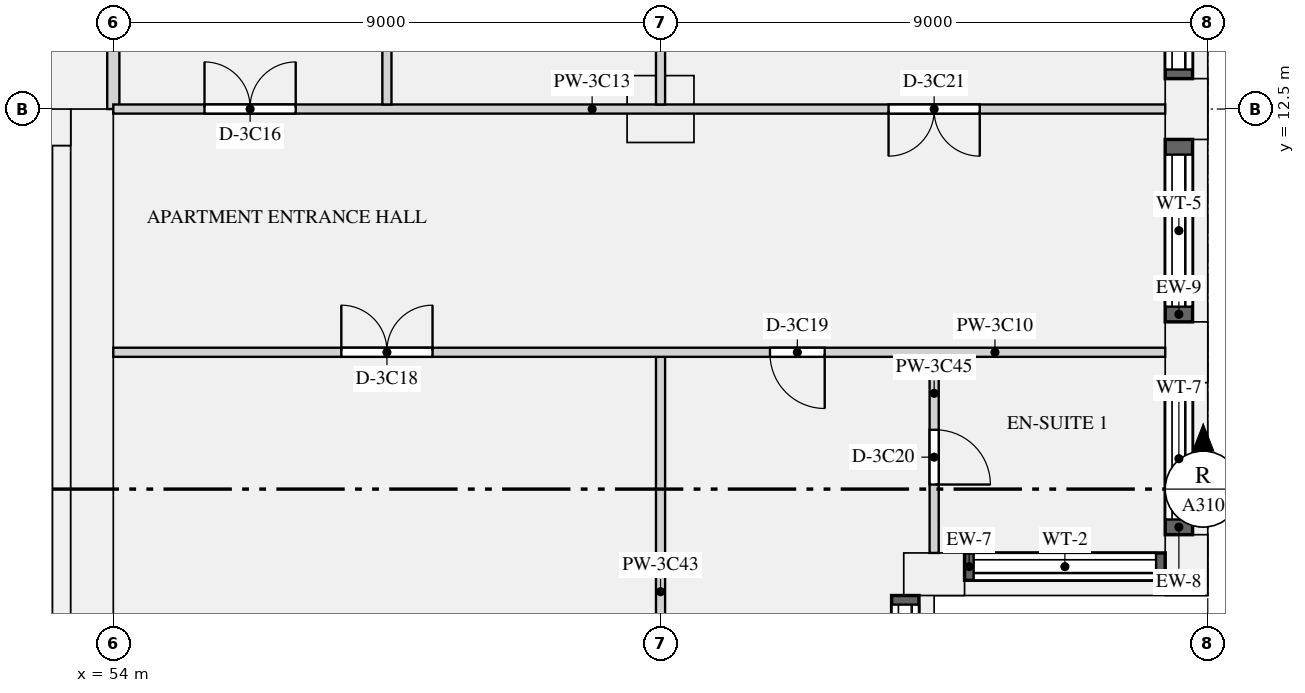
"""IFC4 building model, lengths in metres.
Left out: names, types, materials, properties, quantities, classifications, styles, units other than length and angle.
Written with IfcOpenShell. Run it as: python <this file> out.ifc"""

import sys

from ifc_helpers import new_model, si_unit, direction, frame, frame_2d, origin, origin_2d, place, context, subcontext, project, spatial, rectangle, extrude, element, fill, save


model = new_model("IFC4")
c1 = context("Model", 3, precision=1e-05, world=origin(), true_north=direction((0.0, 1.0)))
c2 = subcontext(c1, "Body", "Model", "MODEL_VIEW")
j1 = project(units=[si_unit("LENGTHUNIT", "METRE"), si_unit("PLANEANGLEUNIT", "RADIAN")], contexts=[c1])
p1 = place(None, origin())
s1 = spatial("IfcSite", under=j1, at=p1, CompositionType="ELEMENT")
p2 = place(p1, origin())
s2 = spatial("IfcBuilding", under=s1, at=p2, CompositionType="ELEMENT")
p3 = place(p2, frame((0.0, 0.0, 160.2)))
s3 = spatial("IfcBuildingStorey", under=s2, at=p3, CompositionType="ELEMENT", Elevation=160.2)
for number, where, z_axis, x_axis in (
    (1, (67.5, 4.85, 0.0), (0.0, 0.0, 1.0), (1.0, 0.0, 0.0)),
    (2, (71.65, 5.0, 0.0), (0.0, 0.0, 1.0), (0.0, 1.0, 0.0)),
    (3, (71.65, 8.5, 0.0), (0.0, 0.0, 1.0), (0.0, 1.0, 0.0)),
    (4, (71.65, 12.5, 0.0), (0.0, 0.0, 1.0), (0.0, 1.0, 0.0)),
):
    element("IfcColumn", number, at=place(p3, frame(where, z_axis=z_axis, x_axis=x_axis)), inside=s3, PredefinedType="USERDEFINED", context=c2, shape_type="SweptSolid", body=[
        extrude(rectangle(XDim=1.0, YDim=0.7, at=origin_2d()), origin(), (0.0, 0.0, 1.0), 3.15),
    ])
p4 = place(p3, frame((63.0, 12.5, 0.0), z_axis=(0.0, 0.0, 1.0), x_axis=(1.0, 0.0, 0.0)))
e5 = element("IfcColumn", 5, at=p4, inside=s3, PredefinedType="COLUMN", context=c2, shape_type="SweptSolid", body=[
    extrude(rectangle(XDim=1.1, YDim=1.1, at=origin_2d()), origin(), (0.0, 0.0, 1.0), 3.15),
])
p5 = place(p3, frame((53.65, 0.0, 0.0), z_axis=(0.0, 0.0, 1.0), x_axis=(0.0, 1.0, 0.0)))
e6 = element("IfcWall", 6, at=p5, inside=s3, PredefinedType="SHEAR", context=c2, shape_type="SweptSolid", body=[
    extrude(rectangle(XDim=12.5, YDim=0.7, at=frame_2d((6.25, 0.0))), origin(), (0.0, 0.0, 1.0), 3.15),
])
p6 = place(p3, frame((18.7, 12.2, 0.0), z_axis=(0.0, 0.0, 1.0), x_axis=(1.0, 0.0, 0.0)))
e7 = element("IfcWall", 7, at=p6, inside=s3, PredefinedType="SHEAR", context=c2, shape_type="SweptSolid", body=[
    extrude(rectangle(XDim=34.6, YDim=0.6, at=frame_2d((17.3, 0.0))), origin(), (0.0, 0.0, 1.0), 3.15),
])
p7 = place(p6, frame((24.475, 0.0, 0.0)))
e8 = element("IfcOpeningElement", 8, at=p7, cuts=e7, PredefinedType="OPENING", context=c2, shape_type="SweptSolid", body=[
    extrude(rectangle(XDim=1.1, YDim=2.1, at=frame_2d((0.55, 1.05))), frame((0.0, 0.31, 0.0), z_axis=(0.0, -1.0, 0.0), x_axis=(1.0, 0.0, 0.0)), (0.0, 0.0, 1.0), 0.62),
])
p8 = place(p6, frame((26.725, 0.0, 0.0)))
e9 = element("IfcOpeningElement", 9, at=p8, cuts=e7, PredefinedType="OPENING", context=c2, shape_type="SweptSolid", body=[
    extrude(rectangle(XDim=1.1, YDim=2.1, at=frame_2d((0.55, 1.05))), frame((0.0, 0.31, 0.0), z_axis=(0.0, -1.0, 0.0), x_axis=(1.0, 0.0, 0.0)), (0.0, 0.0, 1.0), 0.62),
])
p9 = place(p6, frame((28.975, 0.0, 0.0)))
e10 = element("IfcOpeningElement", 10, at=p9, cuts=e7, PredefinedType="OPENING", context=c2, shape_type="SweptSolid", body=[
    extrude(rectangle(XDim=1.1, YDim=2.1, at=frame_2d((0.55, 1.05))), frame((0.0, 0.31, 0.0), z_axis=(0.0, -1.0, 0.0), x_axis=(1.0, 0.0, 0.0)), (0.0, 0.0, 1.0), 0.62),
])
p10 = place(p6, frame((4.85, 0.0, 0.0)))
e11 = element("IfcOpeningElement", 11, at=p10, cuts=e7, PredefinedType="OPENING", context=c2, shape_type="SweptSolid", body=[
    extrude(rectangle(XDim=0.9, YDim=2.1, at=frame_2d((0.45, 1.05))), frame((0.0, 0.31, 0.0), z_axis=(0.0, -1.0, 0.0), x_axis=(1.0, 0.0, 0.0)), (0.0, 0.0, 1.0), 0.62),
])
p11 = place(p6, frame((13.85, 0.0, 0.0)))
e12 = element("IfcOpeningElement", 12, at=p11, cuts=e7, PredefinedType="OPENING", context=c2, shape_type="SweptSolid", body=[
    extrude(rectangle(XDim=0.9, YDim=2.1, at=frame_2d((0.45, 1.05))), frame((0.0, 0.31, 0.0), z_axis=(0.0, -1.0, 0.0), x_axis=(1.0, 0.0, 0.0)), (0.0, 0.0, 1.0), 0.62),
])
p12 = place(p6, frame((18.35, 0.0, 0.0)))
e13 = element("IfcOpeningElement", 13, at=p12, cuts=e7, PredefinedType="OPENING", context=c2, shape_type="SweptSolid", body=[
    extrude(rectangle(XDim=0.9, YDim=2.1, at=frame_2d((0.45, 1.05))), frame((0.0, 0.31, 0.0), z_axis=(0.0, -1.0, 0.0), x_axis=(1.0, 0.0, 0.0)), (0.0, 0.0, 1.0), 0.62),
])
p13 = place(p6, frame((1.45, 0.0, 0.0)))
e14 = element("IfcOpeningElement", 14, at=p13, cuts=e7, PredefinedType="OPENING", context=c2, shape_type="SweptSolid", body=[
    extrude(rectangle(XDim=1.2, YDim=2.1, at=frame_2d((0.6, 1.05))), frame((0.0, 0.31, 0.0), z_axis=(0.0, -1.0, 0.0), x_axis=(1.0, 0.0, 0.0)), (0.0, 0.0, 1.0), 0.62),
])
p14 = place(p6, frame((31.95, 0.0, 0.0)))
e15 = element("IfcOpeningElement", 15, at=p14, cuts=e7, PredefinedType="OPENING", context=c2, shape_type="SweptSolid", body=[
    extrude(rectangle(XDim=1.2, YDim=2.1, at=frame_2d((0.6, 1.05))), frame((0.0, 0.31, 0.0), z_axis=(0.0, -1.0, 0.0), x_axis=(1.0, 0.0, 0.0)), (0.0, 0.0, 1.0), 0.62),
])
p15 = place(p3, frame((53.15, 1.0, 0.0), z_axis=(0.0, 0.0, 1.0), x_axis=(0.0, 1.0, 0.0)))
e16 = element("IfcWall", 16, at=p15, inside=s3, PredefinedType="SHEAR", context=c2, shape_type="SweptSolid", body=[
    extrude(rectangle(XDim=10.9, YDim=0.3, at=frame_2d((5.45, 0.0))), origin(), (0.0, 0.0, 1.0), 3.15),
])
p16 = place(p3, frame((67.025, 1.0, 0.9), z_axis=(0.0, 0.0, 1.0), x_axis=(0.0, 1.0, 0.0)))
e17 = element("IfcWall", 17, at=p16, inside=s3, PredefinedType="SOLIDWALL", context=c2, shape_type="SweptSolid", body=[
    extrude(rectangle(XDim=3.5, YDim=0.45, at=frame_2d((1.75, 0.0))), origin(), (0.0, 0.0, 1.0), 1.93),
])
p17 = place(p16, frame((0.15, 0.0, 0.15)))
e18 = element("IfcOpeningElement", 18, at=p17, cuts=e17, PredefinedType="OPENING", context=c2, shape_type="SweptSolid", body=[
    extrude(rectangle(XDim=3.2, YDim=1.5, at=frame_2d((1.6, 0.75))), frame((0.0, 0.235, 0.0), z_axis=(0.0, -1.0, 0.0), x_axis=(1.0, 0.0, 0.0)), (0.0, 0.0, 1.0), 0.47),
])
p18 = place(p3, frame((68.0, 4.975, 0.9), z_axis=(0.0, 0.0, 1.0), x_axis=(1.0, 0.0, 0.0)))
e19 = element("IfcWall", 19, at=p18, inside=s3, PredefinedType="SOLIDWALL", context=c2, shape_type="SweptSolid", body=[
    extrude(rectangle(XDim=3.3, YDim=0.45, at=frame_2d((1.65, 0.0))), origin(), (0.0, 0.0, 1.0), 1.93),
])
p19 = place(p18, frame((0.15, 0.0, 0.15)))
e20 = element("IfcOpeningElement", 20, at=p19, cuts=e19, PredefinedType="OPENING", context=c2, shape_type="SweptSolid", body=[
    extrude(rectangle(XDim=3.0, YDim=1.5, at=frame_2d((1.5, 0.75))), frame((0.0, 0.235, 0.0), z_axis=(0.0, -1.0, 0.0), x_axis=(1.0, 0.0, 0.0)), (0.0, 0.0, 1.0), 0.47),
])
p20 = place(p3, frame((71.525, 5.5, 0.9), z_axis=(0.0, 0.0, 1.0), x_axis=(0.0, 1.0, 0.0)))
e21 = element("IfcWall", 21, at=p20, inside=s3, PredefinedType="SOLIDWALL", context=c2, shape_type="SweptSolid", body=[
    extrude(rectangle(XDim=2.5, YDim=0.45, at=frame_2d((1.25, 0.0))), origin(), (0.0, 0.0, 1.0), 1.93),
])
p21 = place(p20, frame((0.25, 0.0, 0.15)))
e22 = element("IfcOpeningElement", 22, at=p21, cuts=e21, PredefinedType="OPENING", context=c2, shape_type="SweptSolid", body=[
    extrude(rectangle(XDim=2.0, YDim=1.5, at=frame_2d((1.0, 0.75))), frame((0.0, 0.235, 0.0), z_axis=(0.0, -1.0, 0.0), x_axis=(1.0, 0.0, 0.0)), (0.0, 0.0, 1.0), 0.47),
])
p22 = place(p3, frame((71.525, 9.0, 0.9), z_axis=(0.0, 0.0, 1.0), x_axis=(0.0, 1.0, 0.0)))
e23 = element("IfcWall", 23, at=p22, inside=s3, PredefinedType="SOLIDWALL", context=c2, shape_type="SweptSolid", body=[
    extrude(rectangle(XDim=3.0, YDim=0.45, at=frame_2d((1.5, 0.0))), origin(), (0.0, 0.0, 1.0), 1.93),
])
p23 = place(p22, frame((0.25, 0.0, 0.15)))
e24 = element("IfcOpeningElement", 24, at=p23, cuts=e23, PredefinedType="OPENING", context=c2, shape_type="SweptSolid", body=[
    extrude(rectangle(XDim=2.5, YDim=1.5, at=frame_2d((1.25, 0.75))), frame((0.0, 0.235, 0.0), z_axis=(0.0, -1.0, 0.0), x_axis=(1.0, 0.0, 0.0)), (0.0, 0.0, 1.0), 0.47),
])
p24 = place(p3, frame((71.525, 13.0, 0.9), z_axis=(0.0, 0.0, 1.0), x_axis=(0.0, 1.0, 0.0)))
e25 = element("IfcWall", 25, at=p24, inside=s3, PredefinedType="SOLIDWALL", context=c2, shape_type="SweptSolid", body=[
    extrude(rectangle(XDim=2.8, YDim=0.45, at=frame_2d((1.4, 0.0))), origin(), (0.0, 0.0, 1.0), 1.93),
])
p25 = place(p24, frame((0.15, 0.0, 0.15)))
e26 = element("IfcOpeningElement", 26, at=p25, cuts=e25, PredefinedType="OPENING", context=c2, shape_type="SweptSolid", body=[
    extrude(rectangle(XDim=2.5, YDim=1.5, at=frame_2d((1.25, 0.75))), frame((0.0, 0.235, 0.0), z_axis=(0.0, -1.0, 0.0), x_axis=(1.0, 0.0, 0.0)), (0.0, 0.0, 1.0), 0.47),
])
p26 = place(p3, frame((54.0, 12.5, 0.0), z_axis=(0.0, 0.0, 1.0), x_axis=(0.0, 1.0, 0.0)))
e27 = element("IfcWall", 27, at=p26, inside=s3, PredefinedType="PARTITIONING", context=c2, shape_type="SweptSolid", body=[
    extrude(rectangle(XDim=3.4, YDim=0.2, at=frame_2d((1.7, 0.0))), origin(), (0.0, 0.0, 1.0), 2.83),
])
p27 = place(p3, frame((54.0, 8.5, 0.0), z_axis=(0.0, 0.0, 1.0), x_axis=(1.0, 0.0, 0.0)))
e28 = element("IfcWall", 28, at=p27, inside=s3, PredefinedType="PARTITIONING", context=c2, shape_type="SweptSolid", body=[
    extrude(rectangle(XDim=17.3, YDim=0.15, at=frame_2d((8.65, 0.0))), origin(), (0.0, 0.0, 1.0), 2.83),
])
p28 = place(p27, frame((3.75, 0.0, 0.0)))
e29 = element("IfcOpeningElement", 29, at=p28, cuts=e28, PredefinedType="OPENING", context=c2, shape_type="SweptSolid", body=[
    extrude(rectangle(XDim=1.5, YDim=2.1, at=frame_2d((0.75, 1.05))), frame((0.0, 0.085, 0.0), z_axis=(0.0, -1.0, 0.0), x_axis=(1.0, 0.0, 0.0)), (0.0, 0.0, 1.0), 0.17),
])
p29 = place(p27, frame((10.8, 0.0, 0.0)))
e30 = element("IfcOpeningElement", 30, at=p29, cuts=e28, PredefinedType="OPENING", context=c2, shape_type="SweptSolid", body=[
    extrude(rectangle(XDim=0.9, YDim=2.1, at=frame_2d((0.45, 1.05))), frame((0.0, 0.085, 0.0), z_axis=(0.0, -1.0, 0.0), x_axis=(1.0, 0.0, 0.0)), (0.0, 0.0, 1.0), 0.17),
])
p30 = place(p3, frame((54.0, 12.5, 0.0), z_axis=(0.0, 0.0, 1.0), x_axis=(1.0, 0.0, 0.0)))
e31 = element("IfcWall", 31, at=p30, inside=s3, PredefinedType="PARTITIONING", context=c2, shape_type="SweptSolid", body=[
    extrude(rectangle(XDim=17.3, YDim=0.15, at=frame_2d((8.65, 0.0))), origin(), (0.0, 0.0, 1.0), 2.83),
])
p31 = place(p30, frame((1.5, 0.0, 0.0)))
e32 = element("IfcOpeningElement", 32, at=p31, cuts=e31, PredefinedType="OPENING", context=c2, shape_type="SweptSolid", body=[
    extrude(rectangle(XDim=1.5, YDim=2.1, at=frame_2d((0.75, 1.05))), frame((0.0, 0.085, 0.0), z_axis=(0.0, -1.0, 0.0), x_axis=(1.0, 0.0, 0.0)), (0.0, 0.0, 1.0), 0.17),
])
p32 = place(p30, frame((12.75, 0.0, 0.0)))
e33 = element("IfcOpeningElement", 33, at=p32, cuts=e31, PredefinedType="OPENING", context=c2, shape_type="SweptSolid", body=[
    extrude(rectangle(XDim=1.5, YDim=2.1, at=frame_2d((0.75, 1.05))), frame((0.0, 0.085, 0.0), z_axis=(0.0, -1.0, 0.0), x_axis=(1.0, 0.0, 0.0)), (0.0, 0.0, 1.0), 0.17),
])
p33 = place(p3, frame((58.5, 12.575, 0.0), z_axis=(0.0, 0.0, 1.0), x_axis=(0.0, 1.0, 0.0)))
e34 = element("IfcWall", 34, at=p33, inside=s3, PredefinedType="PARTITIONING", context=c2, shape_type="SweptSolid", body=[
    extrude(rectangle(XDim=10.325, YDim=0.15, at=frame_2d((5.163, 0.0))), origin(), (0.0, 0.0, 1.0), 2.83),
])
p34 = place(p33, frame((4.75, 0.0, 0.0)))
e35 = element("IfcOpeningElement", 35, at=p34, cuts=e34, PredefinedType="OPENING", context=c2, shape_type="SweptSolid", body=[
    extrude(rectangle(XDim=0.9, YDim=2.1, at=frame_2d((0.45, 1.05))), frame((0.0, 0.085, 0.0), z_axis=(0.0, -1.0, 0.0), x_axis=(1.0, 0.0, 0.0)), (0.0, 0.0, 1.0), 0.17),
])
p35 = place(p3, frame((63.0, 0.7, 0.0), z_axis=(0.0, 0.0, 1.0), x_axis=(0.0, 1.0, 0.0)))
e36 = element("IfcWall", 36, at=p35, inside=s3, PredefinedType="PARTITIONING", context=c2, shape_type="SweptSolid", body=[
    extrude(rectangle(XDim=7.725, YDim=0.15, at=frame_2d((3.863, 0.0))), origin(), (0.0, 0.0, 1.0), 2.83),
])
p36 = place(p3, frame((63.0, 12.575, 0.0), z_axis=(0.0, 0.0, 1.0), x_axis=(0.0, 1.0, 0.0)))
e37 = element("IfcWall", 37, at=p36, inside=s3, PredefinedType="PARTITIONING", context=c2, shape_type="SweptSolid", body=[
    extrude(rectangle(XDim=16.35, YDim=0.15, at=frame_2d((8.175, 0.0))), origin(), (0.0, 0.0, 1.0), 2.83),
])
p37 = place(p36, frame((5.225, 0.0, 0.0)))
e38 = element("IfcOpeningElement", 38, at=p37, cuts=e37, PredefinedType="OPENING", context=c2, shape_type="SweptSolid", body=[
    extrude(rectangle(XDim=0.9, YDim=2.1, at=frame_2d((0.45, 1.05))), frame((0.0, 0.085, 0.0), z_axis=(0.0, -1.0, 0.0), x_axis=(1.0, 0.0, 0.0)), (0.0, 0.0, 1.0), 0.17),
])
p38 = place(p36, frame((13.75, 0.0, 0.0)))
e39 = element("IfcOpeningElement", 39, at=p38, cuts=e37, PredefinedType="OPENING", context=c2, shape_type="SweptSolid", body=[
    extrude(rectangle(XDim=0.9, YDim=2.1, at=frame_2d((0.45, 1.05))), frame((0.0, 0.085, 0.0), z_axis=(0.0, -1.0, 0.0), x_axis=(1.0, 0.0, 0.0)), (0.0, 0.0, 1.0), 0.17),
])
p39 = place(p3, frame((67.5, 5.2, 0.0), z_axis=(0.0, 0.0, 1.0), x_axis=(0.0, 1.0, 0.0)))
e40 = element("IfcWall", 40, at=p39, inside=s3, PredefinedType="PARTITIONING", context=c2, shape_type="SweptSolid", body=[
    extrude(rectangle(XDim=3.225, YDim=0.15, at=frame_2d((1.613, 0.0))), origin(), (0.0, 0.0, 1.0), 2.83),
])
p40 = place(p39, frame((1.125, 0.0, 0.0)))
e41 = element("IfcOpeningElement", 41, at=p40, cuts=e40, PredefinedType="OPENING", context=c2, shape_type="SweptSolid", body=[
    extrude(rectangle(XDim=0.9, YDim=2.1, at=frame_2d((0.45, 1.05))), frame((0.0, 0.085, 0.0), z_axis=(0.0, -1.0, 0.0), x_axis=(1.0, 0.0, 0.0)), (0.0, 0.0, 1.0), 0.17),
])
p41 = place(p17, origin())
e42 = element("IfcWindow", 42, at=p41, inside=s3, PartitioningType="SINGLE_PANEL", PredefinedType="WINDOW", context=c2, shape_type="SweptSolid", body=[
    extrude(rectangle(XDim=3.2, YDim=1.5, at=frame_2d((1.6, 0.75))), frame((0.0, -0.065, 0.0), z_axis=(0.0, -1.0, 0.0), x_axis=(1.0, 0.0, 0.0)), (0.0, 0.0, 1.0), 0.06),
])
fill(e18, e42)
p42 = place(p19, origin())
e43 = element("IfcWindow", 43, at=p42, inside=s3, PartitioningType="SINGLE_PANEL", PredefinedType="WINDOW", context=c2, shape_type="SweptSolid", body=[
    extrude(rectangle(XDim=3.0, YDim=1.5, at=frame_2d((1.5, 0.75))), frame((0.0, -0.065, 0.0), z_axis=(0.0, -1.0, 0.0), x_axis=(1.0, 0.0, 0.0)), (0.0, 0.0, 1.0), 0.06),
])
fill(e20, e43)
p43 = place(p21, origin())
e44 = element("IfcWindow", 44, at=p43, inside=s3, PartitioningType="SINGLE_PANEL", PredefinedType="WINDOW", context=c2, shape_type="SweptSolid", body=[
    extrude(rectangle(XDim=2.0, YDim=1.5, at=frame_2d((1.0, 0.75))), frame((0.0, -0.065, 0.0), z_axis=(0.0, -1.0, 0.0), x_axis=(1.0, 0.0, 0.0)), (0.0, 0.0, 1.0), 0.06),
])
fill(e22, e44)
p44 = place(p23, origin())
e45 = element("IfcWindow", 45, at=p44, inside=s3, PartitioningType="SINGLE_PANEL", PredefinedType="WINDOW", context=c2, shape_type="SweptSolid", body=[
    extrude(rectangle(XDim=2.5, YDim=1.5, at=frame_2d((1.25, 0.75))), frame((0.0, -0.065, 0.0), z_axis=(0.0, -1.0, 0.0), x_axis=(1.0, 0.0, 0.0)), (0.0, 0.0, 1.0), 0.06),
])
fill(e24, e45)
p45 = place(p25, origin())
e46 = element("IfcWindow", 46, at=p45, inside=s3, PartitioningType="SINGLE_PANEL", PredefinedType="WINDOW", context=c2, shape_type="SweptSolid", body=[
    extrude(rectangle(XDim=2.5, YDim=1.5, at=frame_2d((1.25, 0.75))), frame((0.0, -0.065, 0.0), z_axis=(0.0, -1.0, 0.0), x_axis=(1.0, 0.0, 0.0)), (0.0, 0.0, 1.0), 0.06),
])
fill(e26, e46)
p46 = place(p31, origin())
e47 = element("IfcDoor", 47, at=p46, inside=s3, OperationType="DOUBLE_DOOR_SINGLE_SWING", PredefinedType="DOOR", context=c2, shape_type="SweptSolid", body=[
    extrude(rectangle(XDim=1.5, YDim=2.1, at=frame_2d((0.75, 1.05))), frame((0.0, 0.025, 0.0), z_axis=(0.0, -1.0, 0.0), x_axis=(1.0, 0.0, 0.0)), (0.0, 0.0, 1.0), 0.05),
])
fill(e32, e47)
p47 = place(p28, origin())
e48 = element("IfcDoor", 48, at=p47, inside=s3, OperationType="DOUBLE_DOOR_SINGLE_SWING", PredefinedType="DOOR", context=c2, shape_type="SweptSolid", body=[
    extrude(rectangle(XDim=1.5, YDim=2.1, at=frame_2d((0.75, 1.05))), frame((0.0, 0.025, 0.0), z_axis=(0.0, -1.0, 0.0), x_axis=(1.0, 0.0, 0.0)), (0.0, 0.0, 1.0), 0.05),
])
fill(e29, e48)
p48 = place(p29, frame((0.9, 0.0, 0.0), z_axis=(0.0, 0.0, 1.0), x_axis=(-1.0, 0.0, 0.0)))
e49 = element("IfcDoor", 49, at=p48, inside=s3, OperationType="SINGLE_SWING_LEFT", PredefinedType="DOOR", context=c2, shape_type="SweptSolid", body=[
    extrude(rectangle(XDim=0.9, YDim=2.1, at=frame_2d((0.45, 1.05))), frame((0.0, 0.025, 0.0), z_axis=(0.0, -1.0, 0.0), x_axis=(1.0, 0.0, 0.0)), (0.0, 0.0, 1.0), 0.05),
])
fill(e30, e49)
p49 = place(p40, frame((0.9, 0.0, 0.0), z_axis=(0.0, 0.0, 1.0), x_axis=(-1.0, 0.0, 0.0)))
e50 = element("IfcDoor", 50, at=p49, inside=s3, OperationType="SINGLE_SWING_RIGHT", PredefinedType="DOOR", context=c2, shape_type="SweptSolid", body=[
    extrude(rectangle(XDim=0.9, YDim=2.1, at=frame_2d((0.45, 1.05))), frame((0.0, 0.025, 0.0), z_axis=(0.0, -1.0, 0.0), x_axis=(1.0, 0.0, 0.0)), (0.0, 0.0, 1.0), 0.05),
])
fill(e41, e50)
p50 = place(p32, frame((1.5, 0.0, 0.0), z_axis=(0.0, 0.0, 1.0), x_axis=(-1.0, 0.0, 0.0)))
e51 = element("IfcDoor", 51, at=p50, inside=s3, OperationType="DOUBLE_DOOR_SINGLE_SWING", PredefinedType="DOOR", context=c2, shape_type="SweptSolid", body=[
    extrude(rectangle(XDim=1.5, YDim=2.1, at=frame_2d((0.75, 1.05))), frame((0.0, 0.025, 0.0), z_axis=(0.0, -1.0, 0.0), x_axis=(1.0, 0.0, 0.0)), (0.0, 0.0, 1.0), 0.05),
])
fill(e33, e51)
save(model, sys.argv[1])
